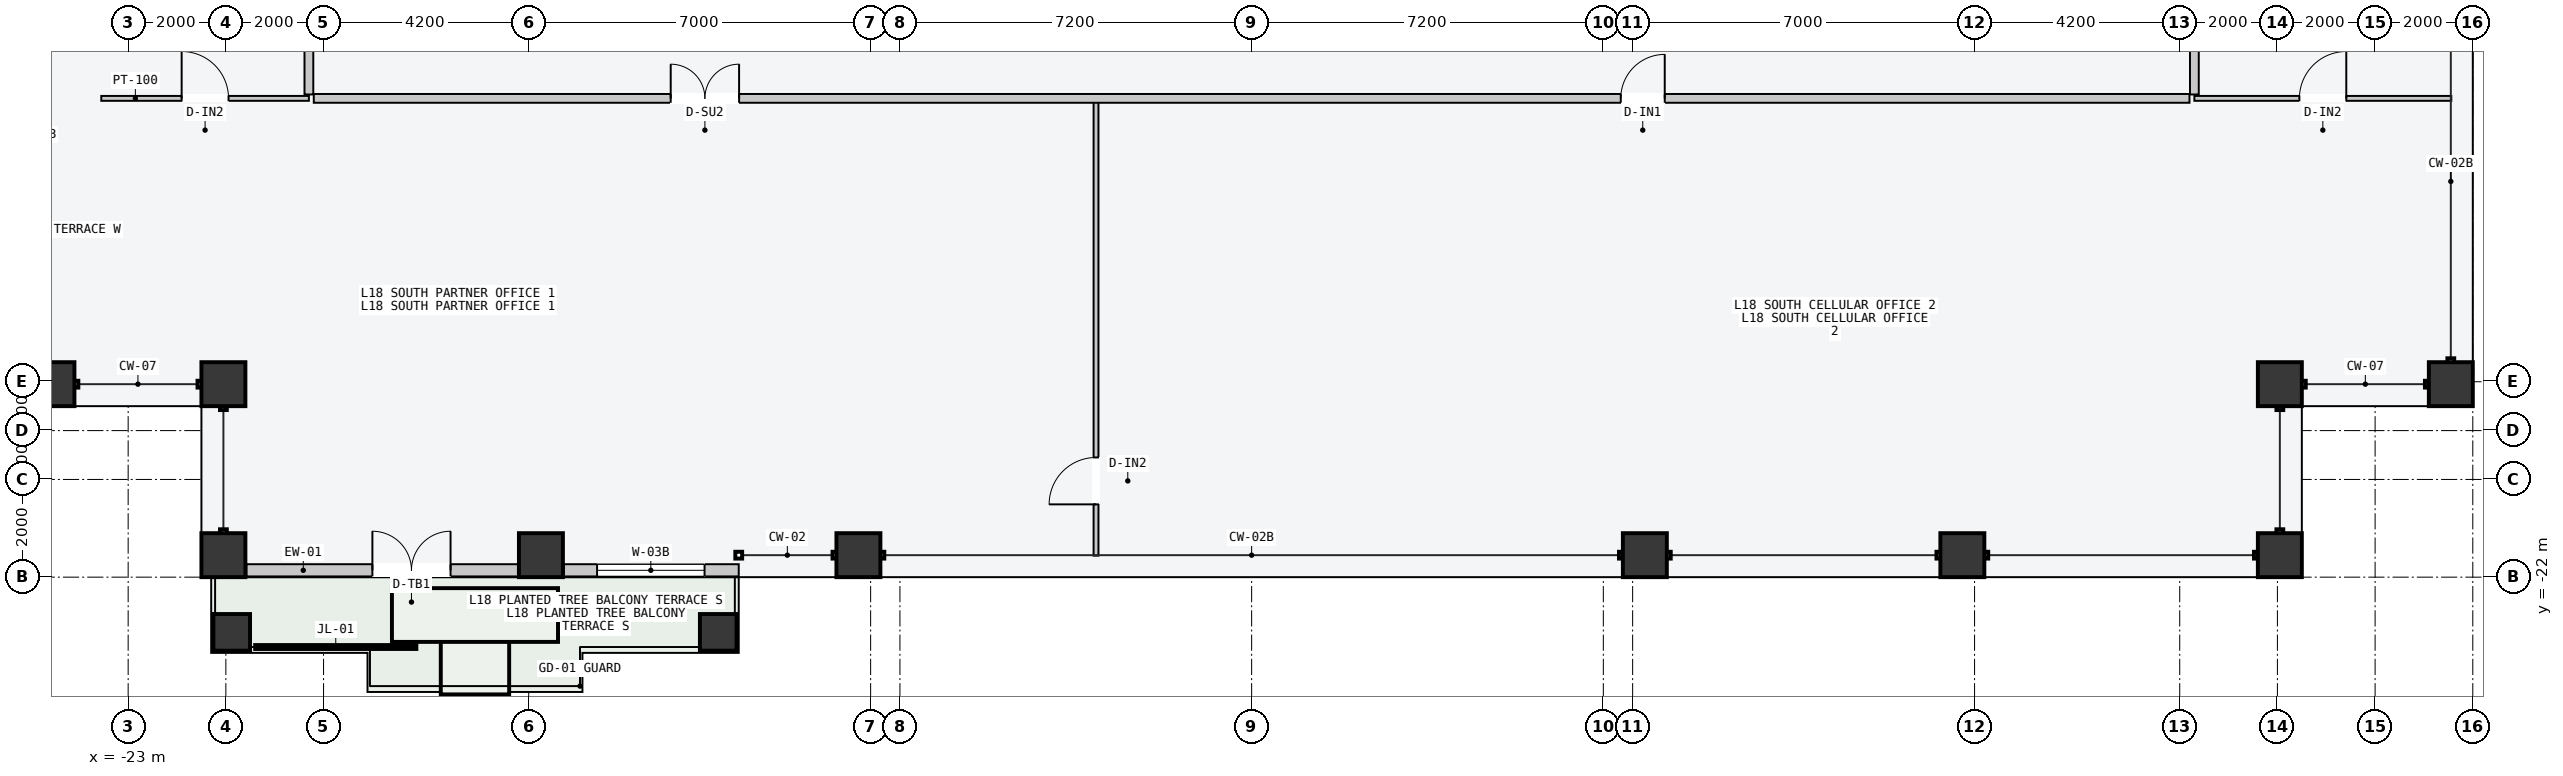
"""IFC4 building model, lengths in metres.
Left out: names, types, materials, properties, quantities, classifications, styles, units other than length and angle.
Written with IfcOpenShell. Run it as: python <this file> out.ifc"""

import sys

from ifc_helpers import new_model, si_unit, direction, frame, frame_2d, origin, origin_2d, place, context, subcontext, project, spatial, rectangle, hollow_rectangle, extrude, element, fill, save


model = new_model("IFC4")
c1 = context("Model", 3, precision=1e-05, world=origin(), true_north=direction((0.0, 1.0)))
c2 = subcontext(c1, "Body", "Model", "MODEL_VIEW")
j1 = project(units=[si_unit("LENGTHUNIT", "METRE"), si_unit("PLANEANGLEUNIT", "RADIAN")], contexts=[c1])
p1 = place(None, origin())
s1 = spatial("IfcSite", under=j1, at=p1, CompositionType="ELEMENT")
p2 = place(p1, origin())
s2 = spatial("IfcBuilding", under=s1, at=p2, CompositionType="ELEMENT")
p3 = place(p2, frame((0.0, 0.0, 70.8)))
s3 = spatial("IfcBuildingStorey", under=s2, at=p3, CompositionType="ELEMENT", Elevation=70.8)
for number, where, z_axis, x_axis in (
    (1, (-21.05, -21.55, 0.0), (0.0, 0.0, 1.0), (1.0, 0.0, 0.0)),
    (2, (-14.55, -21.55, 0.0), (0.0, 0.0, 1.0), (1.0, 0.0, 0.0)),
    (3, (-8.05, -21.55, 0.0), (0.0, 0.0, 1.0), (1.0, 0.0, 0.0)),
    (4, (8.05, -21.55, 0.0), (0.0, 0.0, 1.0), (1.0, 0.0, 0.0)),
    (5, (14.55, -21.55, 0.0), (0.0, 0.0, 1.0), (1.0, 0.0, 0.0)),
    (6, (21.05, -21.55, 0.0), (0.0, 0.0, 1.0), (1.0, 0.0, 0.0)),
    (7, (-24.55, -18.05, 0.0), (0.0, 0.0, 1.0), (0.0, 1.0, 0.0)),
    (8, (24.55, -18.05, 0.0), (0.0, 0.0, 1.0), (0.0, 1.0, 0.0)),
    (9, (21.05, -18.05, 0.0), (0.0, 0.0, 1.0), (1.0, 0.0, 0.0)),
    (10, (-21.05, -18.05, 0.0), (0.0, 0.0, 1.0), (1.0, 0.0, 0.0)),
):
    element("IfcColumn", number, at=place(p3, frame(where, z_axis=z_axis, x_axis=x_axis)), inside=s3, PredefinedType="COLUMN", context=c2, shape_type="SweptSolid", body=[
        extrude(hollow_rectangle(XDim=0.9, YDim=0.9, WallThickness=0.045, at=origin_2d()), origin(), (0.0, 0.0, 1.0), 3.6),
    ])
for number, where, z_axis, x_axis in (
    (11, (-20.88, -23.13, 0.0), (0.0, 0.0, 1.0), (1.0, 0.0, 0.0)),
    (12, (-10.92, -23.13, 0.0), (0.0, 0.0, 1.0), (1.0, 0.0, 0.0)),
):
    element("IfcColumn", number, at=place(p3, frame(where, z_axis=z_axis, x_axis=x_axis)), inside=s3, PredefinedType="COLUMN", context=c2, shape_type="SweptSolid", body=[
        extrude(hollow_rectangle(XDim=0.75, YDim=0.75, WallThickness=0.032, at=origin_2d()), origin(), (0.0, 0.0, 1.0), 3.6),
    ])
p4 = place(p3, frame((-20.58, -21.86, 0.0), z_axis=(0.0, 0.0, 1.0), x_axis=(1.0, 0.0, 0.0)))
e13 = element("IfcWall", 13, at=p4, inside=s3, PredefinedType="STANDARD", context=c2, shape_type="SweptSolid", body=[
    extrude(rectangle(XDim=5.56, YDim=0.25, at=frame_2d((2.78, 0.0))), origin(), (0.0, 0.0, 1.0), 3.4),
])
p5 = place(p4, frame((2.58, 0.0, 0.0)))
e14 = element("IfcOpeningElement", 14, at=p5, cuts=e13, PredefinedType="OPENING", context=c2, shape_type="SweptSolid", body=[
    extrude(rectangle(XDim=1.6, YDim=2.2, at=frame_2d((0.8, 1.1))), frame((0.0, 0.135, 0.0), z_axis=(0.0, -1.0, 0.0), x_axis=(1.0, 0.0, 0.0)), (0.0, 0.0, 1.0), 0.27),
])
p6 = place(p3, frame((-14.08, -21.86, 0.0), z_axis=(0.0, 0.0, 1.0), x_axis=(1.0, 0.0, 0.0)))
e15 = element("IfcWall", 15, at=p6, inside=s3, PredefinedType="STANDARD", context=c2, shape_type="SweptSolid", body=[
    extrude(rectangle(XDim=3.58, YDim=0.25, at=frame_2d((1.79, 0.0))), origin(), (0.0, 0.0, 1.0), 3.4),
])
p7 = place(p6, frame((0.68, 0.0, 0.85)))
e16 = element("IfcOpeningElement", 16, at=p7, cuts=e15, PredefinedType="OPENING", context=c2, shape_type="SweptSolid", body=[
    extrude(rectangle(XDim=2.2, YDim=2.1, at=frame_2d((1.1, 1.05))), frame((0.0, 0.135, 0.0), z_axis=(0.0, -1.0, 0.0), x_axis=(1.0, 0.0, 0.0)), (0.0, 0.0, 1.0), 0.27),
])
p8 = place(p3, frame((-3.186, -21.56, 0.0), z_axis=(0.0, 0.0, 1.0), x_axis=(0.0, 1.0, 0.0)))
e17 = element("IfcWall", 17, at=p8, inside=s3, PredefinedType="PARTITIONING", context=c2, shape_type="SweptSolid", body=[
    extrude(rectangle(XDim=9.3, YDim=0.1, at=frame_2d((4.65, 0.0))), origin(), (0.0, 0.0, 1.0), 3.4),
])
p9 = place(p8, frame((1.05, 0.0, 0.0)))
e18 = element("IfcOpeningElement", 18, at=p9, cuts=e17, PredefinedType="OPENING", context=c2, shape_type="SweptSolid", body=[
    extrude(rectangle(XDim=0.96, YDim=2.18, at=frame_2d((0.48, 1.09))), frame((0.0, 0.06, 0.0), z_axis=(0.0, -1.0, 0.0), x_axis=(1.0, 0.0, 0.0)), (0.0, 0.0, 1.0), 0.12),
])
p10 = place(p3, frame((-19.2, -12.2, 0.0), z_axis=(0.0, 0.0, 1.0), x_axis=(1.0, 0.0, 0.0)))
e19 = element("IfcWall", 19, at=p10, inside=s3, PredefinedType="PARTITIONING", context=c2, shape_type="SweptSolid", body=[
    extrude(rectangle(XDim=38.4, YDim=0.18, at=frame_2d((19.2, 0.0))), origin(), (0.0, 0.0, 1.0), 3.4),
])
p11 = place(p10, frame((7.307, 0.0, 0.0)))
e20 = element("IfcOpeningElement", 20, at=p11, cuts=e19, PredefinedType="OPENING", context=c2, shape_type="SweptSolid", body=[
    extrude(rectangle(XDim=1.4, YDim=2.2, at=frame_2d((0.7, 1.1))), frame((0.0, 0.1, 0.0), z_axis=(0.0, -1.0, 0.0), x_axis=(1.0, 0.0, 0.0)), (0.0, 0.0, 1.0), 0.2),
])
p12 = place(p10, frame((26.757, 0.0, 0.0)))
e21 = element("IfcOpeningElement", 21, at=p12, cuts=e19, PredefinedType="OPENING", context=c2, shape_type="SweptSolid", body=[
    extrude(rectangle(XDim=0.9, YDim=2.15, at=frame_2d((0.45, 1.075))), frame((0.0, 0.1, 0.0), z_axis=(0.0, -1.0, 0.0), x_axis=(1.0, 0.0, 0.0)), (0.0, 0.0, 1.0), 0.2),
])
p13 = place(p3, frame((-23.55, -12.2, 0.0), z_axis=(0.0, 0.0, 1.0), x_axis=(1.0, 0.0, 0.0)))
e22 = element("IfcWall", 22, at=p13, inside=s3, PredefinedType="PARTITIONING", context=c2, shape_type="SweptSolid", body=[
    extrude(rectangle(XDim=4.25, YDim=0.1, at=frame_2d((2.125, 0.0))), origin(), (0.0, 0.0, 1.0), 3.4),
])
p14 = place(p13, frame((1.645, 0.0, 0.0)))
e23 = element("IfcOpeningElement", 23, at=p14, cuts=e22, PredefinedType="OPENING", context=c2, shape_type="SweptSolid", body=[
    extrude(rectangle(XDim=0.96, YDim=2.18, at=frame_2d((0.48, 1.09))), frame((0.0, 0.06, 0.0), z_axis=(0.0, -1.0, 0.0), x_axis=(1.0, 0.0, 0.0)), (0.0, 0.0, 1.0), 0.12),
])
p15 = place(p3, frame((19.3, -12.2, 0.0), z_axis=(0.0, 0.0, 1.0), x_axis=(1.0, 0.0, 0.0)))
e24 = element("IfcWall", 24, at=p15, inside=s3, PredefinedType="PARTITIONING", context=c2, shape_type="SweptSolid", body=[
    extrude(rectangle(XDim=5.26, YDim=0.1, at=frame_2d((2.63, 0.0))), origin(), (0.0, 0.0, 1.0), 3.4),
])
p16 = place(p15, frame((2.15, 0.0, 0.0)))
e25 = element("IfcOpeningElement", 25, at=p16, cuts=e24, PredefinedType="OPENING", context=c2, shape_type="SweptSolid", body=[
    extrude(rectangle(XDim=0.96, YDim=2.18, at=frame_2d((0.48, 1.09))), frame((0.0, 0.06, 0.0), z_axis=(0.0, -1.0, 0.0), x_axis=(1.0, 0.0, 0.0)), (0.0, 0.0, 1.0), 0.12),
])
p17 = place(p3, frame((-19.3, -12.12, 0.0), z_axis=(0.0, 0.0, 1.0), x_axis=(0.0, 1.0, 0.0)))
e26 = element("IfcWall", 26, at=p17, inside=s3, PredefinedType="PARTITIONING", context=c2, shape_type="SweptSolid", body=[
    extrude(rectangle(XDim=25.44, YDim=0.18, at=frame_2d((12.72, 0.0))), origin(), (0.0, 0.0, 1.0), 3.4),
])
p18 = place(p17, frame((12.19, 0.0, 0.0)))
e27 = element("IfcOpeningElement", 27, at=p18, cuts=e26, PredefinedType="OPENING", context=c2, shape_type="SweptSolid", body=[
    extrude(rectangle(XDim=1.06, YDim=2.2, at=frame_2d((0.53, 1.1))), frame((0.0, 0.1, 0.0), z_axis=(0.0, -1.0, 0.0), x_axis=(1.0, 0.0, 0.0)), (0.0, 0.0, 1.0), 0.2),
])
p19 = place(p3, frame((19.3, -12.12, 0.0), z_axis=(0.0, 0.0, 1.0), x_axis=(0.0, 1.0, 0.0)))
e28 = element("IfcWall", 28, at=p19, inside=s3, PredefinedType="PARTITIONING", context=c2, shape_type="SweptSolid", body=[
    extrude(rectangle(XDim=25.44, YDim=0.18, at=frame_2d((12.72, 0.0))), origin(), (0.0, 0.0, 1.0), 3.4),
])
p20 = place(p19, frame((5.067, 0.0, 0.0)))
e29 = element("IfcOpeningElement", 29, at=p20, cuts=e28, PredefinedType="OPENING", context=c2, shape_type="SweptSolid", body=[
    extrude(rectangle(XDim=1.06, YDim=2.2, at=frame_2d((0.53, 1.1))), frame((0.0, 0.1, 0.0), z_axis=(0.0, -1.0, 0.0), x_axis=(1.0, 0.0, 0.0)), (0.0, 0.0, 1.0), 0.2),
])
p21 = place(p19, frame((14.517, 0.0, 0.0)))
e30 = element("IfcOpeningElement", 30, at=p21, cuts=e28, PredefinedType="OPENING", context=c2, shape_type="SweptSolid", body=[
    extrude(rectangle(XDim=1.24, YDim=2.24, at=frame_2d((0.62, 1.12))), frame((0.0, 0.1, 0.0), z_axis=(0.0, -1.0, 0.0), x_axis=(1.0, 0.0, 0.0)), (0.0, 0.0, 1.0), 0.2),
])
p22 = place(p19, frame((21.56, 0.0, 0.0)))
e31 = element("IfcOpeningElement", 31, at=p22, cuts=e28, PredefinedType="OPENING", context=c2, shape_type="SweptSolid", body=[
    extrude(rectangle(XDim=1.4, YDim=2.2, at=frame_2d((0.7, 1.1))), frame((0.0, 0.1, 0.0), z_axis=(0.0, -1.0, 0.0), x_axis=(1.0, 0.0, 0.0)), (0.0, 0.0, 1.0), 0.2),
])
p23 = place(p5, origin())
e32 = element("IfcDoor", 32, at=p23, inside=s3, OperationType="DOUBLE_DOOR_SINGLE_SWING", PredefinedType="DOOR", context=c2, shape_type="SweptSolid", body=[
    extrude(rectangle(XDim=1.6, YDim=2.2, at=frame_2d((0.8, 1.1))), frame((0.0, 0.025, 0.0), z_axis=(0.0, -1.0, 0.0), x_axis=(1.0, 0.0, 0.0)), (0.0, 0.0, 1.0), 0.05),
])
fill(e14, e32)
p24 = place(p7, origin())
e33 = element("IfcWindow", 33, at=p24, inside=s3, PartitioningType="SINGLE_PANEL", PredefinedType="WINDOW", context=c2, shape_type="SweptSolid", body=[
    extrude(rectangle(XDim=2.2, YDim=2.1, at=frame_2d((1.1, 1.05))), frame((0.0, 0.03, 0.0), z_axis=(0.0, -1.0, 0.0), x_axis=(1.0, 0.0, 0.0)), (0.0, 0.0, 1.0), 0.06),
])
fill(e16, e33)
p25 = place(p9, origin())
e34 = element("IfcDoor", 34, at=p25, inside=s3, OperationType="SINGLE_SWING_LEFT", PredefinedType="DOOR", context=c2, shape_type="SweptSolid", body=[
    extrude(rectangle(XDim=0.96, YDim=2.18, at=frame_2d((0.48, 1.09))), frame((0.0, 0.025, 0.0), z_axis=(0.0, -1.0, 0.0), x_axis=(1.0, 0.0, 0.0)), (0.0, 0.0, 1.0), 0.05),
])
fill(e18, e34)
p26 = place(p11, origin())
e35 = element("IfcDoor", 35, at=p26, inside=s3, OperationType="DOUBLE_DOOR_SINGLE_SWING", PredefinedType="DOOR", context=c2, shape_type="SweptSolid", body=[
    extrude(rectangle(XDim=1.4, YDim=2.2, at=frame_2d((0.7, 1.1))), frame((0.0, 0.025, 0.0), z_axis=(0.0, -1.0, 0.0), x_axis=(1.0, 0.0, 0.0)), (0.0, 0.0, 1.0), 0.05),
])
fill(e20, e35)
p27 = place(p12, origin())
e36 = element("IfcDoor", 36, at=p27, inside=s3, OperationType="SINGLE_SWING_RIGHT", PredefinedType="DOOR", context=c2, shape_type="SweptSolid", body=[
    extrude(rectangle(XDim=0.9, YDim=2.15, at=frame_2d((0.45, 1.075))), frame((0.0, 0.025, 0.0), z_axis=(0.0, -1.0, 0.0), x_axis=(1.0, 0.0, 0.0)), (0.0, 0.0, 1.0), 0.05),
])
fill(e21, e36)
p28 = place(p14, origin())
e37 = element("IfcDoor", 37, at=p28, inside=s3, OperationType="SINGLE_SWING_LEFT", PredefinedType="DOOR", context=c2, shape_type="SweptSolid", body=[
    extrude(rectangle(XDim=0.96, YDim=2.18, at=frame_2d((0.48, 1.09))), frame((0.0, 0.025, 0.0), z_axis=(0.0, -1.0, 0.0), x_axis=(1.0, 0.0, 0.0)), (0.0, 0.0, 1.0), 0.05),
])
fill(e23, e37)
p29 = place(p16, origin())
e38 = element("IfcDoor", 38, at=p29, inside=s3, OperationType="SINGLE_SWING_RIGHT", PredefinedType="DOOR", context=c2, shape_type="SweptSolid", body=[
    extrude(rectangle(XDim=0.96, YDim=2.18, at=frame_2d((0.48, 1.09))), frame((0.0, 0.025, 0.0), z_axis=(0.0, -1.0, 0.0), x_axis=(1.0, 0.0, 0.0)), (0.0, 0.0, 1.0), 0.05),
])
fill(e25, e38)
save(model, sys.argv[1])
